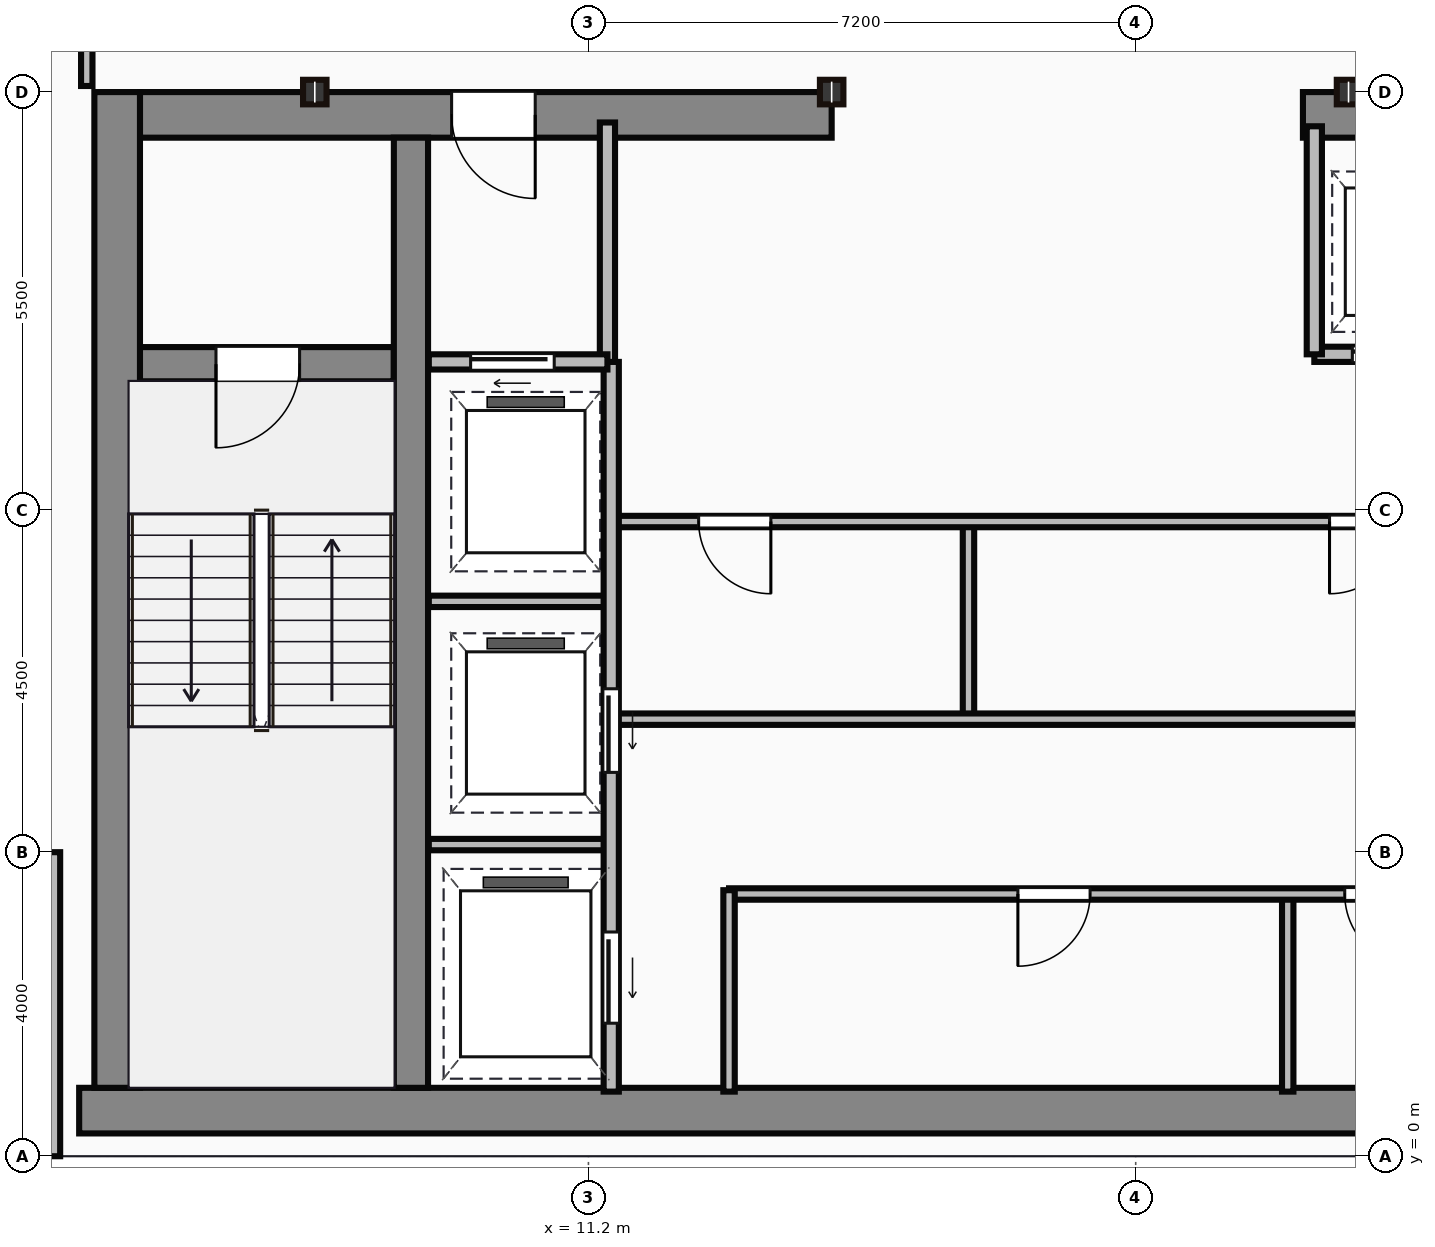
"""IFC4 building model, lengths in metres.
Left out: names, types, materials, properties, quantities, classifications, styles, units other than length and angle.
Written with IfcOpenShell. Run it as: python <this file> out.ifc"""

import sys

from ifc_helpers import new_model, si_unit, direction, frame, frame_2d, origin, origin_2d, place, context, subcontext, project, spatial, rectangle, i_section, extrude, source, transform, mapped, element, fill, save


model = new_model("IFC4")
c1 = context("Model", 3, precision=1e-05, world=origin(), true_north=direction((0.0, 1.0)))
c2 = subcontext(c1, "Body", "Model", "MODEL_VIEW")
j1 = project(units=[si_unit("LENGTHUNIT", "METRE"), si_unit("PLANEANGLEUNIT", "RADIAN")], contexts=[c1])
p1 = place(None, origin())
s1 = spatial("IfcSite", under=j1, at=p1, CompositionType="ELEMENT")
p2 = place(p1, origin())
s2 = spatial("IfcBuilding", under=s1, at=p2, CompositionType="ELEMENT")
p3 = place(p2, frame((0.0, 0.0, 262.45)))
s3 = spatial("IfcBuildingStorey", under=s2, at=p3, CompositionType="ELEMENT", Elevation=262.45)
m1 = source(origin(), c2, "Body", "SweptSolid", [
    extrude(rectangle(XDim=29.5, YDim=0.6, at=frame_2d((14.75, 0.0))), origin(), (0.0, 0.0, 1.0), 3.65),
])
p4 = place(p3, frame((4.5, 0.6, 0.0), z_axis=(0.0, 0.0, 1.0), x_axis=(1.0, 0.0, 0.0)))
e1 = element("IfcWall", 1, at=p4, inside=s3, PredefinedType="SHEAR", context=c2, shape_type="MappedRepresentation", body=[
    mapped(m1, transform((0.0, 0.0, 0.0))),
])
m2 = source(origin(), c2, "Body", "SweptSolid", [
    extrude(rectangle(XDim=13.1, YDim=0.6, at=frame_2d((6.55, 0.0))), origin(), (0.0, 0.0, 1.0), 3.65),
])
p5 = place(p3, frame((5.0, 0.9, 0.0), z_axis=(0.0, 0.0, 1.0), x_axis=(0.0, 1.0, 0.0)))
e2 = element("IfcWall", 2, at=p5, inside=s3, PredefinedType="SHEAR", context=c2, shape_type="MappedRepresentation", body=[
    mapped(m2, transform((0.0, 0.0, 0.0))),
])
m3 = source(origin(), c2, "Body", "SweptSolid", [
    extrude(rectangle(XDim=9.1, YDim=0.6, at=frame_2d((4.55, 0.0))), origin(), (0.0, 0.0, 1.0), 3.65),
])
p6 = place(p3, frame((5.3, 13.7, 0.0), z_axis=(0.0, 0.0, 1.0), x_axis=(1.0, 0.0, 0.0)))
e3 = element("IfcWall", 3, at=p6, inside=s3, PredefinedType="SHEAR", context=c2, shape_type="MappedRepresentation", body=[
    mapped(m3, transform((0.0, 0.0, 0.0))),
])
p7 = place(p6, frame((4.1, 0.0, 0.0)))
e4 = element("IfcOpeningElement", 4, at=p7, cuts=e3, PredefinedType="OPENING", context=c2, shape_type="SweptSolid", body=[
    extrude(rectangle(XDim=1.1, YDim=2.15, at=frame_2d((0.55, 1.075))), frame((0.0, 0.31, 0.0), z_axis=(0.0, -1.0, 0.0), x_axis=(1.0, 0.0, 0.0)), (0.0, 0.0, 1.0), 0.62),
])
m4 = source(origin(), c2, "Body", "SweptSolid", [
    extrude(rectangle(XDim=12.6, YDim=0.6, at=frame_2d((6.3, 0.0))), origin(), (0.0, 0.0, 1.0), 3.65),
])
p8 = place(p3, frame((20.6, 13.7, 0.0), z_axis=(0.0, 0.0, 1.0), x_axis=(1.0, 0.0, 0.0)))
e5 = element("IfcWall", 5, at=p8, inside=s3, PredefinedType="SHEAR", context=c2, shape_type="MappedRepresentation", body=[
    mapped(m4, transform((0.0, 0.0, 0.0))),
])
p9 = place(p8, frame((9.25, 0.0, 0.0)))
e6 = element("IfcOpeningElement", 6, at=p9, cuts=e5, PredefinedType="OPENING", context=c2, shape_type="SweptSolid", body=[
    extrude(rectangle(XDim=1.1, YDim=2.15, at=frame_2d((0.55, 1.075))), frame((0.0, 0.31, 0.0), z_axis=(0.0, -1.0, 0.0), x_axis=(1.0, 0.0, 0.0)), (0.0, 0.0, 1.0), 0.62),
])
m5 = source(origin(), c2, "Body", "SweptSolid", [
    extrude(rectangle(XDim=12.5, YDim=0.45, at=frame_2d((6.25, 0.0))), origin(), (0.0, 0.0, 1.0), 3.65),
])
p10 = place(p3, frame((8.865, 0.9, 0.0), z_axis=(0.0, 0.0, 1.0), x_axis=(0.0, 1.0, 0.0)))
e7 = element("IfcWall", 7, at=p10, inside=s3, PredefinedType="SHEAR", context=c2, shape_type="MappedRepresentation", body=[
    mapped(m5, transform((0.0, 0.0, 0.0))),
])
m6 = source(origin(), c2, "Body", "SweptSolid", [
    extrude(rectangle(XDim=3.39, YDim=0.45, at=frame_2d((1.695, 0.0))), origin(), (0.0, 0.0, 1.0), 3.65),
])
p11 = place(p3, frame((5.25, 10.42, 0.0), z_axis=(0.0, 0.0, 1.0), x_axis=(1.0, 0.0, 0.0)))
e8 = element("IfcWall", 8, at=p11, inside=s3, PredefinedType="SHEAR", context=c2, shape_type="MappedRepresentation", body=[
    mapped(m6, transform((0.0, 0.0, 0.0))),
])
p12 = place(p11, frame((1.05, 0.0, 0.0)))
e9 = element("IfcOpeningElement", 9, at=p12, cuts=e8, PredefinedType="OPENING", context=c2, shape_type="SweptSolid", body=[
    extrude(rectangle(XDim=1.1, YDim=2.15, at=frame_2d((0.55, 1.075))), frame((0.0, 0.235, 0.0), z_axis=(0.0, -1.0, 0.0), x_axis=(1.0, 0.0, 0.0)), (0.0, 0.0, 1.0), 0.47),
])
m7 = source(origin(), c2, "Body", "SweptSolid", [
    extrude(i_section(OverallWidth=0.309, OverallDepth=0.323, WebThickness=0.014, FlangeThickness=0.023, at=origin_2d()), origin(), (0.0, 0.0, 1.0), 3.65),
])
for number, where, z_axis, x_axis in (
    (10, (7.6, 14.0, 0.0), (0.0, 0.0, 1.0), (1.0, 0.0, 0.0)),
    (11, (14.4, 14.0, 0.0), (0.0, 0.0, 1.0), (1.0, 0.0, 0.0)),
    (12, (21.2, 14.0, 0.0), (0.0, 0.0, 1.0), (1.0, 0.0, 0.0)),
):
    element("IfcColumn", number, at=place(p3, frame(where, z_axis=z_axis, x_axis=x_axis)), inside=s3, PredefinedType="COLUMN", context=c2, shape_type="MappedRepresentation", body=[
        mapped(m7, transform((0.0, 0.0, 0.0))),
    ])
m8 = source(origin(), c2, "Body", "SweptSolid", [
    extrude(rectangle(XDim=4.0, YDim=0.25, at=frame_2d((2.0, 0.0))), origin(), (0.0, 0.0, 1.0), 3.4),
])
p13 = place(p3, frame((4.125, 4.0, 0.0), z_axis=(0.0, 0.0, 1.0), x_axis=(0.0, -1.0, 0.0)))
e13 = element("IfcWall", 13, at=p13, inside=s3, PredefinedType="STANDARD", context=c2, shape_type="MappedRepresentation", body=[
    mapped(m8, transform((0.0, 0.0, 0.0))),
])
m9 = source(origin(), c2, "Body", "SweptSolid", [
    extrude(rectangle(XDim=3.18, YDim=0.2, at=frame_2d((1.59, 0.0))), origin(), (0.0, 0.0, 1.0), 3.4),
])
p14 = place(p3, frame((11.45, 10.42, 0.0), z_axis=(0.0, 0.0, 1.0), x_axis=(0.0, 1.0, 0.0)))
e14 = element("IfcWall", 14, at=p14, inside=s3, PredefinedType="PARTITIONING", context=c2, shape_type="MappedRepresentation", body=[
    mapped(m9, transform((0.0, 0.0, 0.0))),
])
m10 = source(origin(), c2, "Body", "SweptSolid", [
    extrude(rectangle(XDim=2.35, YDim=0.2, at=frame_2d((1.175, 0.0))), origin(), (0.0, 0.0, 1.0), 3.4),
])
p15 = place(p3, frame((9.1, 10.45, 0.0), z_axis=(0.0, 0.0, 1.0), x_axis=(1.0, 0.0, 0.0)))
e15 = element("IfcWall", 15, at=p15, inside=s3, PredefinedType="PARTITIONING", context=c2, shape_type="MappedRepresentation", body=[
    mapped(m10, transform((0.0, 0.0, 0.0))),
])
p16 = place(p15, frame((0.55, 0.0, 0.0)))
e16 = element("IfcOpeningElement", 16, at=p16, cuts=e15, PredefinedType="OPENING", context=c2, shape_type="SweptSolid", body=[
    extrude(rectangle(XDim=1.1, YDim=2.15, at=frame_2d((0.55, 1.075))), frame((0.0, 0.11, 0.0), z_axis=(0.0, -1.0, 0.0), x_axis=(1.0, 0.0, 0.0)), (0.0, 0.0, 1.0), 0.22),
])
m11 = source(origin(), c2, "Body", "SweptSolid", [
    extrude(rectangle(XDim=9.6, YDim=0.2, at=frame_2d((4.8, 0.0))), origin(), (0.0, 0.0, 1.0), 3.4),
])
p17 = place(p3, frame((11.5, 0.85, 0.0), z_axis=(0.0, 0.0, 1.0), x_axis=(0.0, 1.0, 0.0)))
e17 = element("IfcWall", 17, at=p17, inside=s3, PredefinedType="PARTITIONING", context=c2, shape_type="MappedRepresentation", body=[
    mapped(m11, transform((0.0, 0.0, 0.0))),
])
p18 = place(p17, frame((4.2, 0.0, 0.0)))
e18 = element("IfcOpeningElement", 18, at=p18, cuts=e17, PredefinedType="OPENING", context=c2, shape_type="SweptSolid", body=[
    extrude(rectangle(XDim=1.1, YDim=2.15, at=frame_2d((0.55, 1.075))), frame((0.0, 0.11, 0.0), z_axis=(0.0, -1.0, 0.0), x_axis=(1.0, 0.0, 0.0)), (0.0, 0.0, 1.0), 0.22),
])
p19 = place(p17, frame((0.9, 0.0, 0.0)))
e19 = element("IfcOpeningElement", 19, at=p19, cuts=e17, PredefinedType="OPENING", context=c2, shape_type="SweptSolid", body=[
    extrude(rectangle(XDim=1.2, YDim=2.15, at=frame_2d((0.6, 1.075))), frame((0.0, 0.11, 0.0), z_axis=(0.0, -1.0, 0.0), x_axis=(1.0, 0.0, 0.0)), (0.0, 0.0, 1.0), 0.22),
])
m12 = source(origin(), c2, "Body", "SweptSolid", [
    extrude(rectangle(XDim=2.4, YDim=0.15, at=frame_2d((1.2, 0.0))), origin(), (0.0, 0.0, 1.0), 3.4),
])
for number, where, z_axis, x_axis in (
    (20, (9.1, 4.1, 0.0), (0.0, 0.0, 1.0), (1.0, 0.0, 0.0)),
    (21, (9.1, 7.3, 0.0), (0.0, 0.0, 1.0), (1.0, 0.0, 0.0)),
):
    element("IfcWall", number, at=place(p3, frame(where, z_axis=z_axis, x_axis=x_axis)), inside=s3, PredefinedType="PARTITIONING", context=c2, shape_type="MappedRepresentation", body=[
        mapped(m12, transform((0.0, 0.0, 0.0))),
    ])
m13 = source(origin(), c2, "Body", "SweptSolid", [
    extrude(rectangle(XDim=2.65, YDim=0.15, at=frame_2d((1.325, 0.0))), origin(), (0.0, 0.0, 1.0), 3.4),
])
p20 = place(p3, frame((13.05, 0.85, 0.0), z_axis=(0.0, 0.0, 1.0), x_axis=(0.0, 1.0, 0.0)))
e22 = element("IfcWall", 22, at=p20, inside=s3, PredefinedType="PARTITIONING", context=c2, shape_type="MappedRepresentation", body=[
    mapped(m13, transform((0.0, 0.0, 0.0))),
])
m14 = source(origin(), c2, "Body", "SweptSolid", [
    extrude(rectangle(XDim=10.35, YDim=0.15, at=frame_2d((5.175, 0.0))), origin(), (0.0, 0.0, 1.0), 3.4),
])
p21 = place(p3, frame((13.05, 3.45, 0.0), z_axis=(0.0, 0.0, 1.0), x_axis=(1.0, 0.0, 0.0)))
e23 = element("IfcWall", 23, at=p21, inside=s3, PredefinedType="PARTITIONING", context=c2, shape_type="MappedRepresentation", body=[
    mapped(m14, transform((0.0, 0.0, 0.0))),
])
p22 = place(p21, frame((3.8, 0.0, 0.0)))
e24 = element("IfcOpeningElement", 24, at=p22, cuts=e23, PredefinedType="OPENING", context=c2, shape_type="SweptSolid", body=[
    extrude(rectangle(XDim=0.95, YDim=2.15, at=frame_2d((0.475, 1.075))), frame((0.0, 0.085, 0.0), z_axis=(0.0, -1.0, 0.0), x_axis=(1.0, 0.0, 0.0)), (0.0, 0.0, 1.0), 0.17),
])
p23 = place(p21, frame((8.1, 0.0, 0.0)))
e25 = element("IfcOpeningElement", 25, at=p23, cuts=e23, PredefinedType="OPENING", context=c2, shape_type="SweptSolid", body=[
    extrude(rectangle(XDim=0.95, YDim=2.15, at=frame_2d((0.475, 1.075))), frame((0.0, 0.085, 0.0), z_axis=(0.0, -1.0, 0.0), x_axis=(1.0, 0.0, 0.0)), (0.0, 0.0, 1.0), 0.17),
])
m15 = source(origin(), c2, "Body", "SweptSolid", [
    extrude(rectangle(XDim=2.6, YDim=0.15, at=frame_2d((1.3, 0.0))), origin(), (0.0, 0.0, 1.0), 3.4),
])
p24 = place(p3, frame((20.4, 0.85, 0.0), z_axis=(0.0, 0.0, 1.0), x_axis=(0.0, 1.0, 0.0)))
e26 = element("IfcWall", 26, at=p24, inside=s3, PredefinedType="PARTITIONING", context=c2, shape_type="MappedRepresentation", body=[
    mapped(m15, transform((0.0, 0.0, 0.0))),
])
m16 = source(origin(), c2, "Body", "SweptSolid", [
    extrude(rectangle(XDim=11.85, YDim=0.15, at=frame_2d((5.925, 0.0))), origin(), (0.0, 0.0, 1.0), 3.4),
])
p25 = place(p3, frame((11.55, 5.75, 0.0), z_axis=(0.0, 0.0, 1.0), x_axis=(1.0, 0.0, 0.0)))
e27 = element("IfcWall", 27, at=p25, inside=s3, PredefinedType="PARTITIONING", context=c2, shape_type="MappedRepresentation", body=[
    mapped(m16, transform((0.0, 0.0, 0.0))),
])
p26 = place(p3, frame((11.55, 8.35, 0.0), z_axis=(0.0, 0.0, 1.0), x_axis=(1.0, 0.0, 0.0)))
e28 = element("IfcWall", 28, at=p26, inside=s3, PredefinedType="PARTITIONING", context=c2, shape_type="MappedRepresentation", body=[
    mapped(m16, transform((0.0, 0.0, 0.0))),
])
p27 = place(p26, frame((1.1, 0.0, 0.0)))
e29 = element("IfcOpeningElement", 29, at=p27, cuts=e28, PredefinedType="OPENING", context=c2, shape_type="SweptSolid", body=[
    extrude(rectangle(XDim=0.95, YDim=2.15, at=frame_2d((0.475, 1.075))), frame((0.0, 0.085, 0.0), z_axis=(0.0, -1.0, 0.0), x_axis=(1.0, 0.0, 0.0)), (0.0, 0.0, 1.0), 0.17),
])
p28 = place(p26, frame((9.4, 0.0, 0.0)))
e30 = element("IfcOpeningElement", 30, at=p28, cuts=e28, PredefinedType="OPENING", context=c2, shape_type="SweptSolid", body=[
    extrude(rectangle(XDim=0.95, YDim=2.15, at=frame_2d((0.475, 1.075))), frame((0.0, 0.085, 0.0), z_axis=(0.0, -1.0, 0.0), x_axis=(1.0, 0.0, 0.0)), (0.0, 0.0, 1.0), 0.17),
])
m17 = source(origin(), c2, "Body", "SweptSolid", [
    extrude(rectangle(XDim=2.5, YDim=0.15, at=frame_2d((1.25, 0.0))), origin(), (0.0, 0.0, 1.0), 3.4),
])
p29 = place(p3, frame((16.2, 5.8, 0.0), z_axis=(0.0, 0.0, 1.0), x_axis=(0.0, 1.0, 0.0)))
e31 = element("IfcWall", 31, at=p29, inside=s3, PredefinedType="PARTITIONING", context=c2, shape_type="MappedRepresentation", body=[
    mapped(m17, transform((0.0, 0.0, 0.0))),
])
m18 = source(origin(), c2, "Body", "SweptSolid", [
    extrude(rectangle(XDim=8.8, YDim=0.2, at=frame_2d((4.4, 0.0))), origin(), (0.0, 0.0, 1.0), 3.4),
])
p30 = place(p3, frame((20.75, 10.55, 0.0), z_axis=(0.0, 0.0, 1.0), x_axis=(1.0, 0.0, 0.0)))
e32 = element("IfcWall", 32, at=p30, inside=s3, PredefinedType="PARTITIONING", context=c2, shape_type="MappedRepresentation", body=[
    mapped(m18, transform((0.0, 0.0, 0.0))),
])
p31 = place(p30, frame((0.5, 0.0, 0.0)))
e33 = element("IfcOpeningElement", 33, at=p31, cuts=e32, PredefinedType="OPENING", context=c2, shape_type="SweptSolid", body=[
    extrude(rectangle(XDim=1.05, YDim=2.15, at=frame_2d((0.525, 1.075))), frame((0.0, 0.11, 0.0), z_axis=(0.0, -1.0, 0.0), x_axis=(1.0, 0.0, 0.0)), (0.0, 0.0, 1.0), 0.22),
])
p32 = place(p30, frame((2.6, 0.0, 0.0)))
e34 = element("IfcOpeningElement", 34, at=p32, cuts=e32, PredefinedType="OPENING", context=c2, shape_type="SweptSolid", body=[
    extrude(rectangle(XDim=1.05, YDim=2.15, at=frame_2d((0.525, 1.075))), frame((0.0, 0.11, 0.0), z_axis=(0.0, -1.0, 0.0), x_axis=(1.0, 0.0, 0.0)), (0.0, 0.0, 1.0), 0.22),
])
p33 = place(p30, frame((4.7, 0.0, 0.0)))
e35 = element("IfcOpeningElement", 35, at=p33, cuts=e32, PredefinedType="OPENING", context=c2, shape_type="SweptSolid", body=[
    extrude(rectangle(XDim=1.05, YDim=2.15, at=frame_2d((0.525, 1.075))), frame((0.0, 0.11, 0.0), z_axis=(0.0, -1.0, 0.0), x_axis=(1.0, 0.0, 0.0)), (0.0, 0.0, 1.0), 0.22),
])
p34 = place(p30, frame((6.8, 0.0, 0.0)))
e36 = element("IfcOpeningElement", 36, at=p34, cuts=e32, PredefinedType="OPENING", context=c2, shape_type="SweptSolid", body=[
    extrude(rectangle(XDim=1.05, YDim=2.15, at=frame_2d((0.525, 1.075))), frame((0.0, 0.11, 0.0), z_axis=(0.0, -1.0, 0.0), x_axis=(1.0, 0.0, 0.0)), (0.0, 0.0, 1.0), 0.22),
])
m19 = source(origin(), c2, "Body", "SweptSolid", [
    extrude(rectangle(XDim=3.0, YDim=0.2, at=frame_2d((1.5, 0.0))), origin(), (0.0, 0.0, 1.0), 3.4),
])
p35 = place(p3, frame((20.75, 10.55, 0.0), z_axis=(0.0, 0.0, 1.0), x_axis=(0.0, 1.0, 0.0)))
e37 = element("IfcWall", 37, at=p35, inside=s3, PredefinedType="PARTITIONING", context=c2, shape_type="MappedRepresentation", body=[
    mapped(m19, transform((0.0, 0.0, 0.0))),
])
m20 = source(origin(), c2, "Body", "SweptSolid", [
    extrude(rectangle(XDim=2.12, YDim=0.15, at=frame_2d((1.06, 0.0))), origin(), (0.0, 0.0, 1.0), 3.4),
])
p36 = place(p3, frame((4.6, 14.08, 0.0), z_axis=(0.0, 0.0, 1.0), x_axis=(0.0, 1.0, 0.0)))
e38 = element("IfcWall", 38, at=p36, inside=s3, PredefinedType="PARTITIONING", context=c2, shape_type="MappedRepresentation", body=[
    mapped(m20, transform((0.0, 0.0, 0.0))),
])
m21 = source(origin(), c2, "Body", "SweptSolid", [
    extrude(rectangle(XDim=1.1, YDim=2.15, at=frame_2d((0.55, 1.075))), frame((0.0, 0.025, 0.0), z_axis=(0.0, -1.0, 0.0), x_axis=(1.0, 0.0, 0.0)), (0.0, 0.0, 1.0), 0.05),
])
p37 = place(p12, frame((1.1, 0.0, 0.0), z_axis=(0.0, 0.0, 1.0), x_axis=(-1.0, 0.0, 0.0)))
e39 = element("IfcDoor", 39, at=p37, inside=s3, OperationType="SINGLE_SWING_LEFT", PredefinedType="DOOR", context=c2, shape_type="MappedRepresentation", body=[
    mapped(m21, transform((0.0, 0.0, 0.0))),
])
fill(e9, e39)
p38 = place(p7, origin())
e40 = element("IfcDoor", 40, at=p38, inside=s3, OperationType="SINGLE_SWING_RIGHT", PredefinedType="DOOR", context=c2, shape_type="MappedRepresentation", body=[
    mapped(m21, transform((0.0, 0.0, 0.0))),
])
fill(e4, e40)
p39 = place(p16, origin())
e41 = element("IfcDoor", 41, at=p39, inside=s3, OperationType="SLIDING_TO_LEFT", PredefinedType="DOOR", context=c2, shape_type="MappedRepresentation", body=[
    mapped(m21, transform((0.0, 0.0, 0.0))),
])
fill(e16, e41)
p40 = place(p18, frame((1.1, 0.0, 0.0), z_axis=(0.0, 0.0, 1.0), x_axis=(-1.0, 0.0, 0.0)))
e42 = element("IfcDoor", 42, at=p40, inside=s3, OperationType="SLIDING_TO_LEFT", PredefinedType="DOOR", context=c2, shape_type="MappedRepresentation", body=[
    mapped(m21, transform((0.0, 0.0, 0.0))),
])
fill(e18, e42)
m22 = source(origin(), c2, "Body", "SweptSolid", [
    extrude(rectangle(XDim=1.2, YDim=2.15, at=frame_2d((0.6, 1.075))), frame((0.0, 0.025, 0.0), z_axis=(0.0, -1.0, 0.0), x_axis=(1.0, 0.0, 0.0)), (0.0, 0.0, 1.0), 0.05),
])
p41 = place(p19, frame((1.2, 0.0, 0.0), z_axis=(0.0, 0.0, 1.0), x_axis=(-1.0, 0.0, 0.0)))
e43 = element("IfcDoor", 43, at=p41, inside=s3, OperationType="SLIDING_TO_LEFT", PredefinedType="DOOR", context=c2, shape_type="MappedRepresentation", body=[
    mapped(m22, transform((0.0, 0.0, 0.0))),
])
fill(e19, e43)
m23 = source(origin(), c2, "Body", "SweptSolid", [
    extrude(rectangle(XDim=0.95, YDim=2.15, at=frame_2d((0.475, 1.075))), frame((0.0, 0.025, 0.0), z_axis=(0.0, -1.0, 0.0), x_axis=(1.0, 0.0, 0.0)), (0.0, 0.0, 1.0), 0.05),
])
p42 = place(p22, origin())
e44 = element("IfcDoor", 44, at=p42, inside=s3, OperationType="SINGLE_SWING_LEFT", PredefinedType="DOOR", context=c2, shape_type="MappedRepresentation", body=[
    mapped(m23, transform((0.0, 0.0, 0.0))),
])
fill(e24, e44)
p43 = place(p23, origin())
e45 = element("IfcDoor", 45, at=p43, inside=s3, OperationType="SINGLE_SWING_RIGHT", PredefinedType="DOOR", context=c2, shape_type="MappedRepresentation", body=[
    mapped(m23, transform((0.0, 0.0, 0.0))),
])
fill(e25, e45)
p44 = place(p27, origin())
e46 = element("IfcDoor", 46, at=p44, inside=s3, OperationType="SINGLE_SWING_RIGHT", PredefinedType="DOOR", context=c2, shape_type="MappedRepresentation", body=[
    mapped(m23, transform((0.0, 0.0, 0.0))),
])
fill(e29, e46)
p45 = place(p28, origin())
e47 = element("IfcDoor", 47, at=p45, inside=s3, OperationType="SINGLE_SWING_LEFT", PredefinedType="DOOR", context=c2, shape_type="MappedRepresentation", body=[
    mapped(m23, transform((0.0, 0.0, 0.0))),
])
fill(e30, e47)
m24 = source(origin(), c2, "Body", "SweptSolid", [
    extrude(rectangle(XDim=1.05, YDim=2.15, at=frame_2d((0.525, 1.075))), frame((0.0, 0.025, 0.0), z_axis=(0.0, -1.0, 0.0), x_axis=(1.0, 0.0, 0.0)), (0.0, 0.0, 1.0), 0.05),
])
p46 = place(p31, frame((1.05, 0.0, 0.0), z_axis=(0.0, 0.0, 1.0), x_axis=(-1.0, 0.0, 0.0)))
e48 = element("IfcDoor", 48, at=p46, inside=s3, OperationType="SLIDING_TO_LEFT", PredefinedType="DOOR", context=c2, shape_type="MappedRepresentation", body=[
    mapped(m24, transform((0.0, 0.0, 0.0))),
])
fill(e33, e48)
save(model, sys.argv[1])
